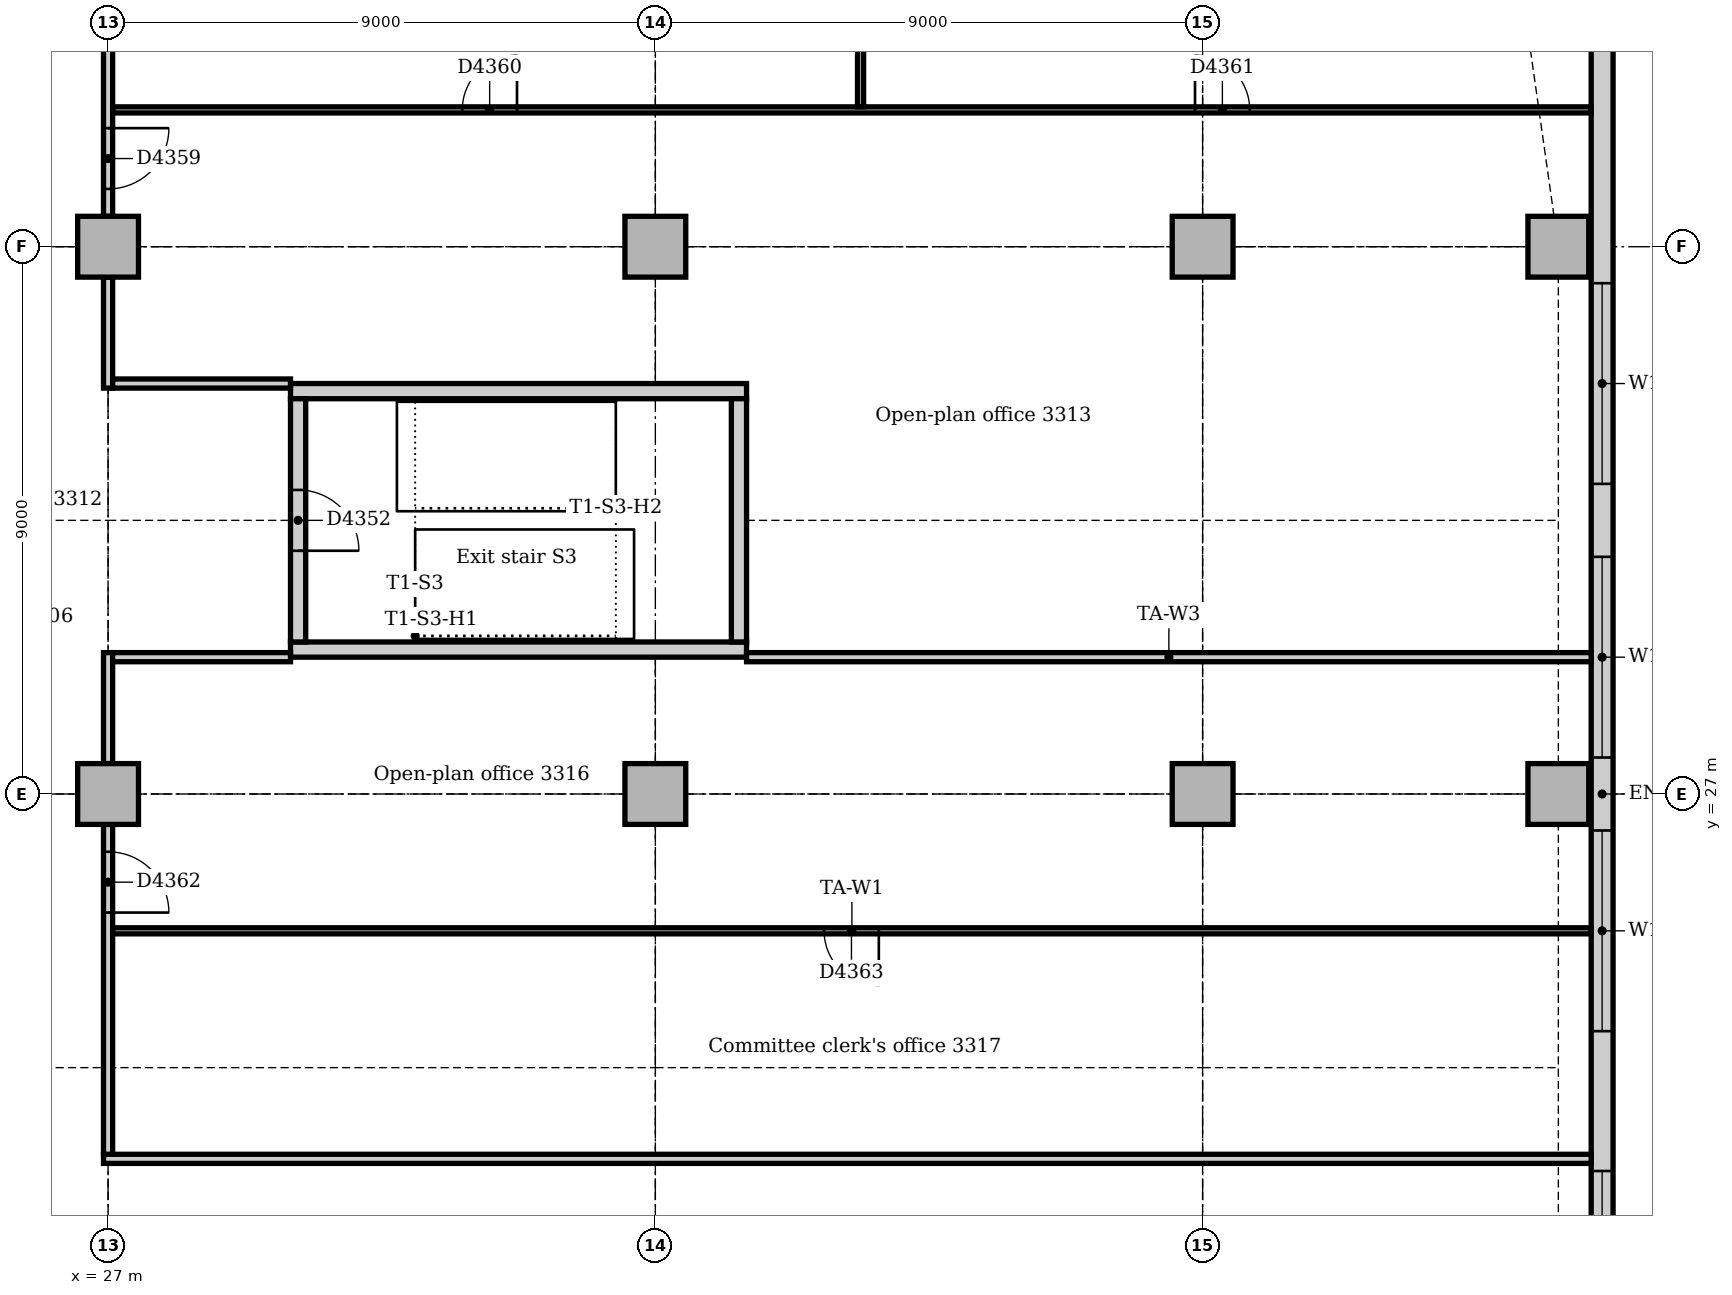
"""IFC4 building model, lengths in metres.
Left out: names, types, materials, properties, quantities, classifications, styles, units other than length and angle.
Written with IfcOpenShell. Run it as: python <this file> out.ifc"""

import sys

from ifc_helpers import new_model, si_unit, direction, frame, frame_2d, origin, origin_2d, place, context, subcontext, project, spatial, rectangle, extrude, element, fill, save


model = new_model("IFC4")
c1 = context("Model", 3, precision=1e-05, world=origin(), true_north=direction((0.0, 1.0)))
c2 = subcontext(c1, "Body", "Model", "MODEL_VIEW")
j1 = project(units=[si_unit("LENGTHUNIT", "METRE"), si_unit("PLANEANGLEUNIT", "RADIAN")], contexts=[c1])
p1 = place(None, origin())
s1 = spatial("IfcSite", under=j1, at=p1, CompositionType="ELEMENT")
p2 = place(p1, origin())
s2 = spatial("IfcBuilding", under=s1, at=p2, CompositionType="ELEMENT")
p3 = place(p2, frame((0.0, 0.0, 140.0)))
s3 = spatial("IfcBuildingStorey", under=s2, at=p3, CompositionType="ELEMENT", Elevation=140.0)
for number, where, z_axis, x_axis in (
    (1, (30.0, 29.375, 0.0), (0.0, 0.0, 1.0), (1.0, 0.0, 0.0)),
    (2, (37.5, 33.625, 0.0), (0.0, 0.0, 1.0), (-1.0, 0.0, 0.0)),
):
    element("IfcWall", number, at=place(p3, frame(where, z_axis=z_axis, x_axis=x_axis)), inside=s3, PredefinedType="SOLIDWALL", context=c2, shape_type="SweptSolid", body=[
        extrude(rectangle(XDim=7.5, YDim=0.25, at=frame_2d((3.75, 0.0))), origin(), (0.0, 0.0, 1.0), 4.0),
    ])
p4 = place(p3, frame((37.375, 29.5, 0.0), z_axis=(0.0, 0.0, 1.0), x_axis=(0.0, 1.0, 0.0)))
e3 = element("IfcWall", 3, at=p4, inside=s3, PredefinedType="SOLIDWALL", context=c2, shape_type="SweptSolid", body=[
    extrude(rectangle(XDim=4.0, YDim=0.25, at=frame_2d((2.0, 0.0))), origin(), (0.0, 0.0, 1.0), 4.0),
])
p5 = place(p3, frame((30.125, 33.5, 0.0), z_axis=(0.0, 0.0, 1.0), x_axis=(0.0, -1.0, 0.0)))
e4 = element("IfcWall", 4, at=p5, inside=s3, PredefinedType="SOLIDWALL", context=c2, shape_type="SweptSolid", body=[
    extrude(rectangle(XDim=4.0, YDim=0.25, at=frame_2d((2.0, 0.0))), origin(), (0.0, 0.0, 1.0), 4.0),
])
p6 = place(p5, frame((1.5, 0.0, 0.0)))
e5 = element("IfcOpeningElement", 5, at=p6, cuts=e4, PredefinedType="OPENING", context=c2, shape_type="SweptSolid", body=[
    extrude(rectangle(XDim=1.0, YDim=2.1, at=frame_2d((0.5, 1.05))), frame((0.0, 0.135, 0.0), z_axis=(0.0, -1.0, 0.0), x_axis=(1.0, 0.0, 0.0)), (0.0, 0.0, 1.0), 0.27),
])
for number, where, z_axis, x_axis in (
    (6, (50.85, 27.0, 0.0), (0.0, 0.0, 1.0), (1.0, 0.0, 0.0)),
    (7, (50.85, 36.0, 0.0), (0.0, 0.0, 1.0), (1.0, 0.0, 0.0)),
    (8, (27.0, 27.0, 0.0), (0.0, 0.0, 1.0), (1.0, 0.0, 0.0)),
    (9, (27.0, 36.0, 0.0), (0.0, 0.0, 1.0), (1.0, 0.0, 0.0)),
    (10, (36.0, 27.0, 0.0), (0.0, 0.0, 1.0), (1.0, 0.0, 0.0)),
    (11, (36.0, 36.0, 0.0), (0.0, 0.0, 1.0), (1.0, 0.0, 0.0)),
    (12, (45.0, 27.0, 0.0), (0.0, 0.0, 1.0), (1.0, 0.0, 0.0)),
    (13, (45.0, 36.0, 0.0), (0.0, 0.0, 1.0), (1.0, 0.0, 0.0)),
):
    element("IfcColumn", number, at=place(p3, frame(where, z_axis=z_axis, x_axis=x_axis)), inside=s3, PredefinedType="COLUMN", context=c2, shape_type="SweptSolid", body=[
        extrude(rectangle(XDim=1.0, YDim=1.0, at=origin_2d()), origin(), (0.0, 0.0, 1.0), 3.7),
    ])
p7 = place(p3, frame((51.57, 14.743, 0.0), z_axis=(0.0, 0.0, 1.0), x_axis=(0.0, 1.0, 0.0)))
e14 = element("IfcWall", 14, at=p7, inside=s3, PredefinedType="STANDARD", context=c2, shape_type="SweptSolid", body=[
    extrude(rectangle(XDim=24.515, YDim=0.36, at=frame_2d((12.257, 0.0))), origin(), (0.0, 0.0, 1.0), 3.7),
])
p8 = place(p7, frame((4.257, 0.0, 0.9)))
e15 = element("IfcOpeningElement", 15, at=p8, cuts=e14, PredefinedType="OPENING", context=c2, shape_type="SweptSolid", body=[
    extrude(rectangle(XDim=1.8, YDim=1.6, at=frame_2d((0.9, 0.8))), frame((0.0, 0.19, 0.0), z_axis=(0.0, -1.0, 0.0), x_axis=(1.0, 0.0, 0.0)), (0.0, 0.0, 1.0), 0.38),
])
p9 = place(p7, frame((8.357, 0.0, 0.9)))
e16 = element("IfcOpeningElement", 16, at=p9, cuts=e14, PredefinedType="OPENING", context=c2, shape_type="SweptSolid", body=[
    extrude(rectangle(XDim=3.3, YDim=1.6, at=frame_2d((1.65, 0.8))), frame((0.0, 0.19, 0.0), z_axis=(0.0, -1.0, 0.0), x_axis=(1.0, 0.0, 0.0)), (0.0, 0.0, 1.0), 0.38),
])
p10 = place(p7, frame((12.857, 0.0, 0.9)))
e17 = element("IfcOpeningElement", 17, at=p10, cuts=e14, PredefinedType="OPENING", context=c2, shape_type="SweptSolid", body=[
    extrude(rectangle(XDim=3.3, YDim=1.6, at=frame_2d((1.65, 0.8))), frame((0.0, 0.19, 0.0), z_axis=(0.0, -1.0, 0.0), x_axis=(1.0, 0.0, 0.0)), (0.0, 0.0, 1.0), 0.38),
])
p11 = place(p7, frame((17.357, 0.0, 0.9)))
e18 = element("IfcOpeningElement", 18, at=p11, cuts=e14, PredefinedType="OPENING", context=c2, shape_type="SweptSolid", body=[
    extrude(rectangle(XDim=3.3, YDim=1.6, at=frame_2d((1.65, 0.8))), frame((0.0, 0.19, 0.0), z_axis=(0.0, -1.0, 0.0), x_axis=(1.0, 0.0, 0.0)), (0.0, 0.0, 1.0), 0.38),
])
p12 = place(p3, frame((26.925, 21.0, 0.0), z_axis=(0.0, 0.0, 1.0), x_axis=(1.0, 0.0, 0.0)))
e19 = element("IfcWall", 19, at=p12, inside=s3, PredefinedType="PARTITIONING", context=c2, shape_type="SweptSolid", body=[
    extrude(rectangle(XDim=24.465, YDim=0.15, at=frame_2d((12.232, 0.0))), origin(), (0.0, 0.0, 1.0), 3.7),
])
p13 = place(p3, frame((27.0, 33.675, 0.0), z_axis=(0.0, 0.0, 1.0), x_axis=(0.0, 1.0, 0.0)))
e20 = element("IfcWall", 20, at=p13, inside=s3, PredefinedType="PARTITIONING", context=c2, shape_type="SweptSolid", body=[
    extrude(rectangle(XDim=1.825, YDim=0.15, at=frame_2d((0.912, 0.0))), origin(), (0.0, 0.0, 1.0), 3.106),
])
p14 = place(p3, frame((27.0, 36.5, 0.0), z_axis=(0.0, 0.0, 1.0), x_axis=(0.0, 1.0, 0.0)))
e21 = element("IfcWall", 21, at=p14, inside=s3, PredefinedType="PARTITIONING", context=c2, shape_type="SweptSolid", body=[
    extrude(rectangle(XDim=7.1, YDim=0.15, at=frame_2d((3.55, 0.0))), origin(), (0.0, 0.0, 1.0), 3.106),
])
p15 = place(p14, frame((0.45, 0.0, 0.0)))
e22 = element("IfcOpeningElement", 22, at=p15, cuts=e21, PredefinedType="OPENING", context=c2, shape_type="SweptSolid", body=[
    extrude(rectangle(XDim=1.0, YDim=2.1, at=frame_2d((0.5, 1.05))), frame((0.0, 0.085, 0.0), z_axis=(0.0, -1.0, 0.0), x_axis=(1.0, 0.0, 0.0)), (0.0, 0.0, 1.0), 0.17),
])
p16 = place(p3, frame((27.0, 21.075, 0.0), z_axis=(0.0, 0.0, 1.0), x_axis=(0.0, 1.0, 0.0)))
e23 = element("IfcWall", 23, at=p16, inside=s3, PredefinedType="PARTITIONING", context=c2, shape_type="SweptSolid", body=[
    extrude(rectangle(XDim=5.425, YDim=0.15, at=frame_2d((2.712, 0.0))), origin(), (0.0, 0.0, 1.0), 3.106),
])
p17 = place(p16, frame((3.975, 0.0, 0.0)))
e24 = element("IfcOpeningElement", 24, at=p17, cuts=e23, PredefinedType="OPENING", context=c2, shape_type="SweptSolid", body=[
    extrude(rectangle(XDim=1.0, YDim=2.1, at=frame_2d((0.5, 1.05))), frame((0.0, 0.085, 0.0), z_axis=(0.0, -1.0, 0.0), x_axis=(1.0, 0.0, 0.0)), (0.0, 0.0, 1.0), 0.17),
])
p18 = place(p3, frame((27.0, 27.5, 0.0), z_axis=(0.0, 0.0, 1.0), x_axis=(0.0, 1.0, 0.0)))
e25 = element("IfcWall", 25, at=p18, inside=s3, PredefinedType="PARTITIONING", context=c2, shape_type="SweptSolid", body=[
    extrude(rectangle(XDim=1.825, YDim=0.15, at=frame_2d((0.912, 0.0))), origin(), (0.0, 0.0, 1.0), 3.106),
])
for number, where, z_axis, x_axis in (
    (26, (27.075, 29.25, 0.0), (0.0, 0.0, 1.0), (1.0, 0.0, 0.0)),
    (27, (27.075, 33.75, 0.0), (0.0, 0.0, 1.0), (1.0, 0.0, 0.0)),
):
    element("IfcWall", number, at=place(p3, frame(where, z_axis=z_axis, x_axis=x_axis)), inside=s3, PredefinedType="PARTITIONING", context=c2, shape_type="SweptSolid", body=[
        extrude(rectangle(XDim=2.925, YDim=0.15, at=frame_2d((1.462, 0.0))), origin(), (0.0, 0.0, 1.0), 3.7),
    ])
p19 = place(p3, frame((37.5, 29.25, 0.0), z_axis=(0.0, 0.0, 1.0), x_axis=(1.0, 0.0, 0.0)))
e28 = element("IfcWall", 28, at=p19, inside=s3, PredefinedType="PARTITIONING", context=c2, shape_type="SweptSolid", body=[
    extrude(rectangle(XDim=13.89, YDim=0.15, at=frame_2d((6.945, 0.0))), origin(), (0.0, 0.0, 1.0), 3.7),
])
p20 = place(p3, frame((27.075, 24.75, 0.0), z_axis=(0.0, 0.0, 1.0), x_axis=(1.0, 0.0, 0.0)))
e29 = element("IfcWall", 29, at=p20, inside=s3, PredefinedType="PARTITIONING", context=c2, shape_type="SweptSolid", body=[
    extrude(rectangle(XDim=24.315, YDim=0.1, at=frame_2d((12.158, 0.0))), origin(), (0.0, 0.0, 1.0), 3.7),
])
p21 = place(p20, frame((11.7, 0.0, 0.0)))
e30 = element("IfcOpeningElement", 30, at=p21, cuts=e29, PredefinedType="OPENING", context=c2, shape_type="SweptSolid", body=[
    extrude(rectangle(XDim=0.9, YDim=2.1, at=frame_2d((0.45, 1.05))), frame((0.0, 0.06, 0.0), z_axis=(0.0, -1.0, 0.0), x_axis=(1.0, 0.0, 0.0)), (0.0, 0.0, 1.0), 0.12),
])
p22 = place(p3, frame((27.075, 38.25, 0.0), z_axis=(0.0, 0.0, 1.0), x_axis=(1.0, 0.0, 0.0)))
e31 = element("IfcWall", 31, at=p22, inside=s3, PredefinedType="PARTITIONING", context=c2, shape_type="SweptSolid", body=[
    extrude(rectangle(XDim=24.315, YDim=0.1, at=frame_2d((12.158, 0.0))), origin(), (0.0, 0.0, 1.0), 3.7),
])
p23 = place(p22, frame((5.75, 0.0, 0.0)))
e32 = element("IfcOpeningElement", 32, at=p23, cuts=e31, PredefinedType="OPENING", context=c2, shape_type="SweptSolid", body=[
    extrude(rectangle(XDim=0.9, YDim=2.1, at=frame_2d((0.45, 1.05))), frame((0.0, 0.06, 0.0), z_axis=(0.0, -1.0, 0.0), x_axis=(1.0, 0.0, 0.0)), (0.0, 0.0, 1.0), 0.12),
])
p24 = place(p22, frame((17.8, 0.0, 0.0)))
e33 = element("IfcOpeningElement", 33, at=p24, cuts=e31, PredefinedType="OPENING", context=c2, shape_type="SweptSolid", body=[
    extrude(rectangle(XDim=0.9, YDim=2.1, at=frame_2d((0.45, 1.05))), frame((0.0, 0.06, 0.0), z_axis=(0.0, -1.0, 0.0), x_axis=(1.0, 0.0, 0.0)), (0.0, 0.0, 1.0), 0.12),
])
p25 = place(p3, frame((39.375, 38.3, 0.0), z_axis=(0.0, 0.0, 1.0), x_axis=(0.0, 1.0, 0.0)))
e34 = element("IfcWall", 34, at=p25, inside=s3, PredefinedType="PARTITIONING", context=c2, shape_type="SweptSolid", body=[
    extrude(rectangle(XDim=10.84, YDim=0.1, at=frame_2d((5.42, 0.0))), origin(), (0.0, 0.0, 1.0), 3.7),
])
p26 = place(p8, origin())
e35 = element("IfcWindow", 35, at=p26, inside=s3, PartitioningType="SINGLE_PANEL", PredefinedType="WINDOW", context=c2, shape_type="SweptSolid", body=[
    extrude(rectangle(XDim=1.8, YDim=1.6, at=frame_2d((0.9, 0.8))), frame((0.0, 0.13, 0.0), z_axis=(0.0, -1.0, 0.0), x_axis=(1.0, 0.0, 0.0)), (0.0, 0.0, 1.0), 0.06),
])
fill(e15, e35)
p27 = place(p9, origin())
e36 = element("IfcWindow", 36, at=p27, inside=s3, PartitioningType="SINGLE_PANEL", PredefinedType="WINDOW", context=c2, shape_type="SweptSolid", body=[
    extrude(rectangle(XDim=3.3, YDim=1.6, at=frame_2d((1.65, 0.8))), frame((0.0, 0.13, 0.0), z_axis=(0.0, -1.0, 0.0), x_axis=(1.0, 0.0, 0.0)), (0.0, 0.0, 1.0), 0.06),
])
fill(e16, e36)
p28 = place(p10, origin())
e37 = element("IfcWindow", 37, at=p28, inside=s3, PartitioningType="SINGLE_PANEL", PredefinedType="WINDOW", context=c2, shape_type="SweptSolid", body=[
    extrude(rectangle(XDim=3.3, YDim=1.6, at=frame_2d((1.65, 0.8))), frame((0.0, 0.13, 0.0), z_axis=(0.0, -1.0, 0.0), x_axis=(1.0, 0.0, 0.0)), (0.0, 0.0, 1.0), 0.06),
])
fill(e17, e37)
p29 = place(p11, origin())
e38 = element("IfcWindow", 38, at=p29, inside=s3, PartitioningType="SINGLE_PANEL", PredefinedType="WINDOW", context=c2, shape_type="SweptSolid", body=[
    extrude(rectangle(XDim=3.3, YDim=1.6, at=frame_2d((1.65, 0.8))), frame((0.0, 0.13, 0.0), z_axis=(0.0, -1.0, 0.0), x_axis=(1.0, 0.0, 0.0)), (0.0, 0.0, 1.0), 0.06),
])
fill(e18, e38)
p30 = place(p6, origin())
e39 = element("IfcDoor", 39, at=p30, inside=s3, OperationType="SINGLE_SWING_RIGHT", PredefinedType="DOOR", context=c2, shape_type="SweptSolid", body=[
    extrude(rectangle(XDim=1.0, YDim=2.1, at=frame_2d((0.5, 1.05))), frame((0.0, 0.025, 0.0), z_axis=(0.0, -1.0, 0.0), x_axis=(1.0, 0.0, 0.0)), (0.0, 0.0, 1.0), 0.05),
])
fill(e5, e39)
p31 = place(p15, frame((1.0, 0.0, 0.0), z_axis=(0.0, 0.0, 1.0), x_axis=(-1.0, 0.0, 0.0)))
e40 = element("IfcDoor", 40, at=p31, inside=s3, OperationType="SINGLE_SWING_LEFT", PredefinedType="DOOR", context=c2, shape_type="SweptSolid", body=[
    extrude(rectangle(XDim=1.0, YDim=2.1, at=frame_2d((0.5, 1.05))), frame((0.0, 0.025, 0.0), z_axis=(0.0, -1.0, 0.0), x_axis=(1.0, 0.0, 0.0)), (0.0, 0.0, 1.0), 0.05),
])
fill(e22, e40)
p32 = place(p23, origin())
e41 = element("IfcDoor", 41, at=p32, inside=s3, OperationType="SINGLE_SWING_RIGHT", PredefinedType="DOOR", context=c2, shape_type="SweptSolid", body=[
    extrude(rectangle(XDim=0.9, YDim=2.1, at=frame_2d((0.45, 1.05))), frame((0.0, 0.025, 0.0), z_axis=(0.0, -1.0, 0.0), x_axis=(1.0, 0.0, 0.0)), (0.0, 0.0, 1.0), 0.05),
])
fill(e32, e41)
p33 = place(p24, origin())
e42 = element("IfcDoor", 42, at=p33, inside=s3, OperationType="SINGLE_SWING_LEFT", PredefinedType="DOOR", context=c2, shape_type="SweptSolid", body=[
    extrude(rectangle(XDim=0.9, YDim=2.1, at=frame_2d((0.45, 1.05))), frame((0.0, 0.025, 0.0), z_axis=(0.0, -1.0, 0.0), x_axis=(1.0, 0.0, 0.0)), (0.0, 0.0, 1.0), 0.05),
])
fill(e33, e42)
p34 = place(p17, frame((1.0, 0.0, 0.0), z_axis=(0.0, 0.0, 1.0), x_axis=(-1.0, 0.0, 0.0)))
e43 = element("IfcDoor", 43, at=p34, inside=s3, OperationType="SINGLE_SWING_RIGHT", PredefinedType="DOOR", context=c2, shape_type="SweptSolid", body=[
    extrude(rectangle(XDim=1.0, YDim=2.1, at=frame_2d((0.5, 1.05))), frame((0.0, 0.025, 0.0), z_axis=(0.0, -1.0, 0.0), x_axis=(1.0, 0.0, 0.0)), (0.0, 0.0, 1.0), 0.05),
])
fill(e24, e43)
p35 = place(p21, frame((0.9, 0.0, 0.0), z_axis=(0.0, 0.0, 1.0), x_axis=(-1.0, 0.0, 0.0)))
e44 = element("IfcDoor", 44, at=p35, inside=s3, OperationType="SINGLE_SWING_LEFT", PredefinedType="DOOR", context=c2, shape_type="SweptSolid", body=[
    extrude(rectangle(XDim=0.9, YDim=2.1, at=frame_2d((0.45, 1.05))), frame((0.0, 0.025, 0.0), z_axis=(0.0, -1.0, 0.0), x_axis=(1.0, 0.0, 0.0)), (0.0, 0.0, 1.0), 0.05),
])
fill(e30, e44)
save(model, sys.argv[1])
